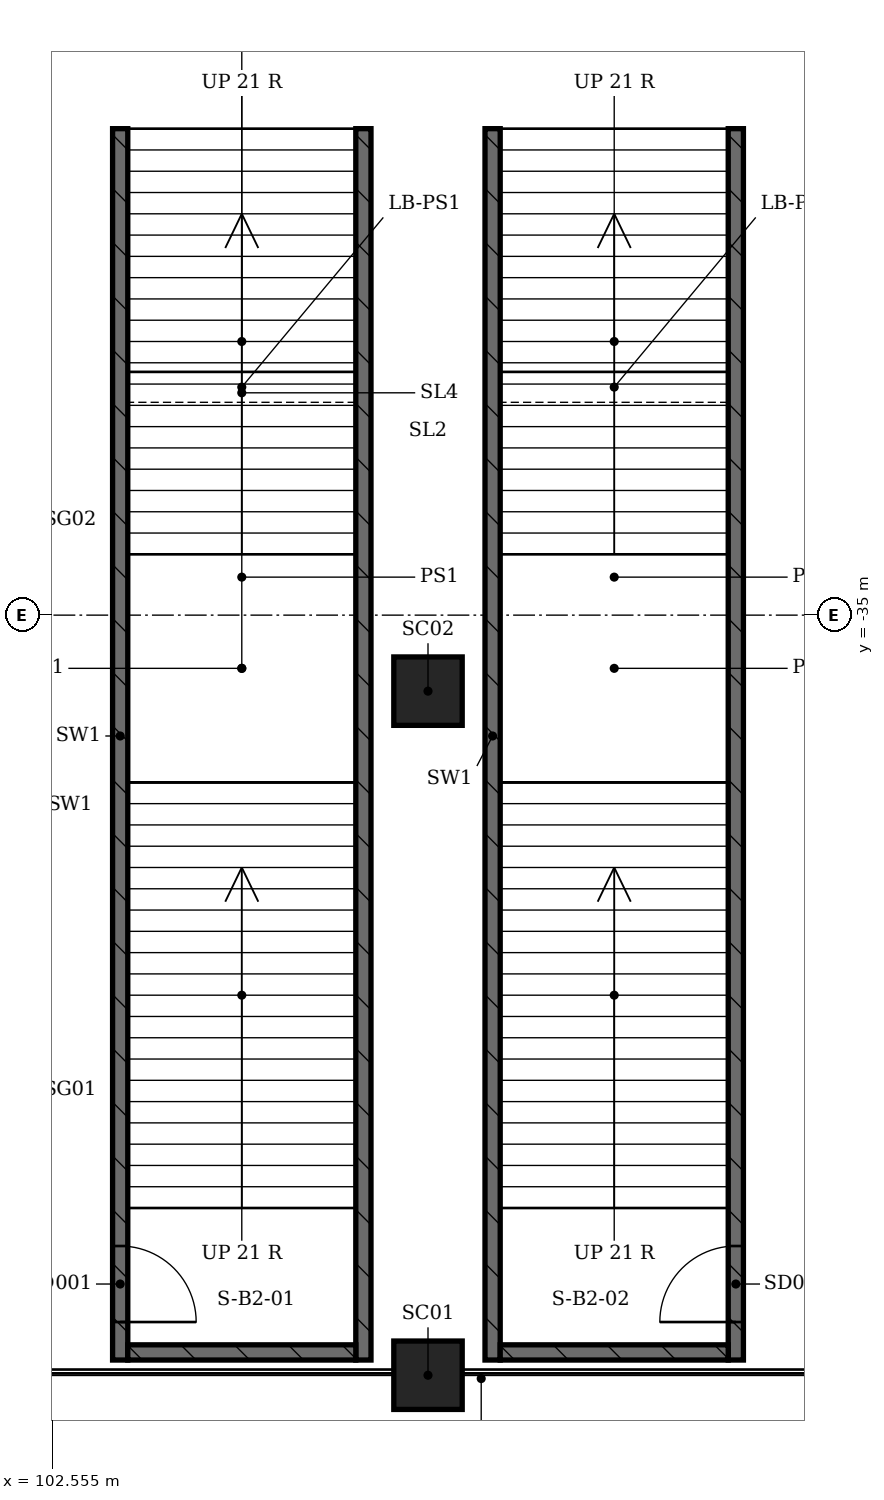
"""IFC4 building model, lengths in metres.
Left out: names, types, materials, properties, quantities, classifications, styles, units other than length and angle.
Written with IfcOpenShell. Run it as: python <this file> out.ifc"""

import sys

from ifc_helpers import new_model, si_unit, direction, frame, frame_2d, origin, origin_2d, place, context, subcontext, project, spatial, rectangle, extrude, element, fill, save


model = new_model("IFC4")
c1 = context("Model", 3, precision=1e-05, world=origin(), true_north=direction((0.0, 1.0)))
c2 = subcontext(c1, "Body", "Model", "MODEL_VIEW")
j1 = project(units=[si_unit("LENGTHUNIT", "METRE"), si_unit("PLANEANGLEUNIT", "RADIAN")], contexts=[c1])
p1 = place(None, origin())
s1 = spatial("IfcSite", under=j1, at=p1, CompositionType="ELEMENT")
p2 = place(p1, origin())
s2 = spatial("IfcBuilding", under=s1, at=p2, CompositionType="ELEMENT")
p3 = place(p2, frame((0.0, 0.0, -11.4)))
s3 = spatial("IfcBuildingStorey", under=s2, at=p3, CompositionType="ELEMENT", Elevation=-11.4)
p4 = place(p3, frame((103.45, -44.8, -1.1), z_axis=(0.0, 0.0, 1.0), x_axis=(0.0, 1.0, 0.0)))
e1 = element("IfcWall", 1, at=p4, inside=s3, PredefinedType="SHEAR", context=c2, shape_type="SweptSolid", body=[
    extrude(rectangle(XDim=16.2, YDim=0.2, at=frame_2d((8.1, 0.0))), origin(), (0.0, 0.0, 1.0), 8.0),
])
p5 = place(p4, frame((0.5, 0.0, 1.1)))
e2 = element("IfcOpeningElement", 2, at=p5, cuts=e1, PredefinedType="OPENING", context=c2, shape_type="SweptSolid", body=[
    extrude(rectangle(XDim=1.0, YDim=2.1, at=frame_2d((0.5, 1.05))), frame((0.0, 0.1, 0.0), z_axis=(0.0, -1.0, 0.0), x_axis=(1.0, 0.0, 0.0)), (0.0, 0.0, 1.0), 0.2),
])
p6 = place(p3, frame((106.65, -44.8, -1.1), z_axis=(0.0, 0.0, 1.0), x_axis=(0.0, 1.0, 0.0)))
e3 = element("IfcWall", 3, at=p6, inside=s3, PredefinedType="SHEAR", context=c2, shape_type="SweptSolid", body=[
    extrude(rectangle(XDim=16.2, YDim=0.2, at=frame_2d((8.1, 0.0))), origin(), (0.0, 0.0, 1.0), 8.0),
])
p7 = place(p3, frame((103.55, -44.7, -1.1), z_axis=(0.0, 0.0, 1.0), x_axis=(1.0, 0.0, 0.0)))
e4 = element("IfcWall", 4, at=p7, inside=s3, PredefinedType="SHEAR", context=c2, shape_type="SweptSolid", body=[
    extrude(rectangle(XDim=3.0, YDim=0.2, at=frame_2d((1.5, 0.0))), origin(), (0.0, 0.0, 1.0), 8.0),
])
p8 = place(p3, frame((108.35, -44.8, -1.1), z_axis=(0.0, 0.0, 1.0), x_axis=(0.0, 1.0, 0.0)))
e5 = element("IfcWall", 5, at=p8, inside=s3, PredefinedType="SHEAR", context=c2, shape_type="SweptSolid", body=[
    extrude(rectangle(XDim=16.2, YDim=0.2, at=frame_2d((8.1, 0.0))), origin(), (0.0, 0.0, 1.0), 8.0),
])
p9 = place(p3, frame((111.55, -44.8, -1.1), z_axis=(0.0, 0.0, 1.0), x_axis=(0.0, 1.0, 0.0)))
e6 = element("IfcWall", 6, at=p9, inside=s3, PredefinedType="SHEAR", context=c2, shape_type="SweptSolid", body=[
    extrude(rectangle(XDim=16.2, YDim=0.2, at=frame_2d((8.1, 0.0))), origin(), (0.0, 0.0, 1.0), 8.0),
])
p10 = place(p9, frame((0.5, 0.0, 1.1)))
e7 = element("IfcOpeningElement", 7, at=p10, cuts=e6, PredefinedType="OPENING", context=c2, shape_type="SweptSolid", body=[
    extrude(rectangle(XDim=1.0, YDim=2.1, at=frame_2d((0.5, 1.05))), frame((0.0, 0.1, 0.0), z_axis=(0.0, -1.0, 0.0), x_axis=(1.0, 0.0, 0.0)), (0.0, 0.0, 1.0), 0.2),
])
p11 = place(p3, frame((108.45, -44.7, -1.1), z_axis=(0.0, 0.0, 1.0), x_axis=(1.0, 0.0, 0.0)))
e8 = element("IfcWall", 8, at=p11, inside=s3, PredefinedType="SHEAR", context=c2, shape_type="SweptSolid", body=[
    extrude(rectangle(XDim=3.0, YDim=0.2, at=frame_2d((1.5, 0.0))), origin(), (0.0, 0.0, 1.0), 8.0),
])
for number, where, z_axis, x_axis in (
    (9, (107.5, -45.0, -1.1), (0.0, 0.0, 1.0), (1.0, 0.0, 0.0)),
    (10, (107.5, -36.0, -1.1), (0.0, 0.0, 1.0), (1.0, 0.0, 0.0)),
):
    element("IfcColumn", number, at=place(p3, frame(where, z_axis=z_axis, x_axis=x_axis)), inside=s3, PredefinedType="COLUMN", context=c2, shape_type="SweptSolid", body=[
        extrude(rectangle(XDim=0.9, YDim=0.9, at=origin_2d()), origin(), (0.0, 0.0, 1.0), 7.5),
    ])
p12 = place(p5, origin())
e11 = element("IfcDoor", 11, at=p12, inside=s3, OperationType="SINGLE_SWING_LEFT", PredefinedType="DOOR", context=c2, shape_type="SweptSolid", body=[
    extrude(rectangle(XDim=1.0, YDim=2.1, at=frame_2d((0.5, 1.05))), frame((0.0, 0.025, 0.0), z_axis=(0.0, -1.0, 0.0), x_axis=(1.0, 0.0, 0.0)), (0.0, 0.0, 1.0), 0.05),
])
fill(e2, e11)
p13 = place(p10, origin())
e12 = element("IfcDoor", 12, at=p13, inside=s3, OperationType="SINGLE_SWING_RIGHT", PredefinedType="DOOR", context=c2, shape_type="SweptSolid", body=[
    extrude(rectangle(XDim=1.0, YDim=2.1, at=frame_2d((0.5, 1.05))), frame((0.0, 0.025, 0.0), z_axis=(0.0, -1.0, 0.0), x_axis=(1.0, 0.0, 0.0)), (0.0, 0.0, 1.0), 0.05),
])
fill(e7, e12)
save(model, sys.argv[1])
